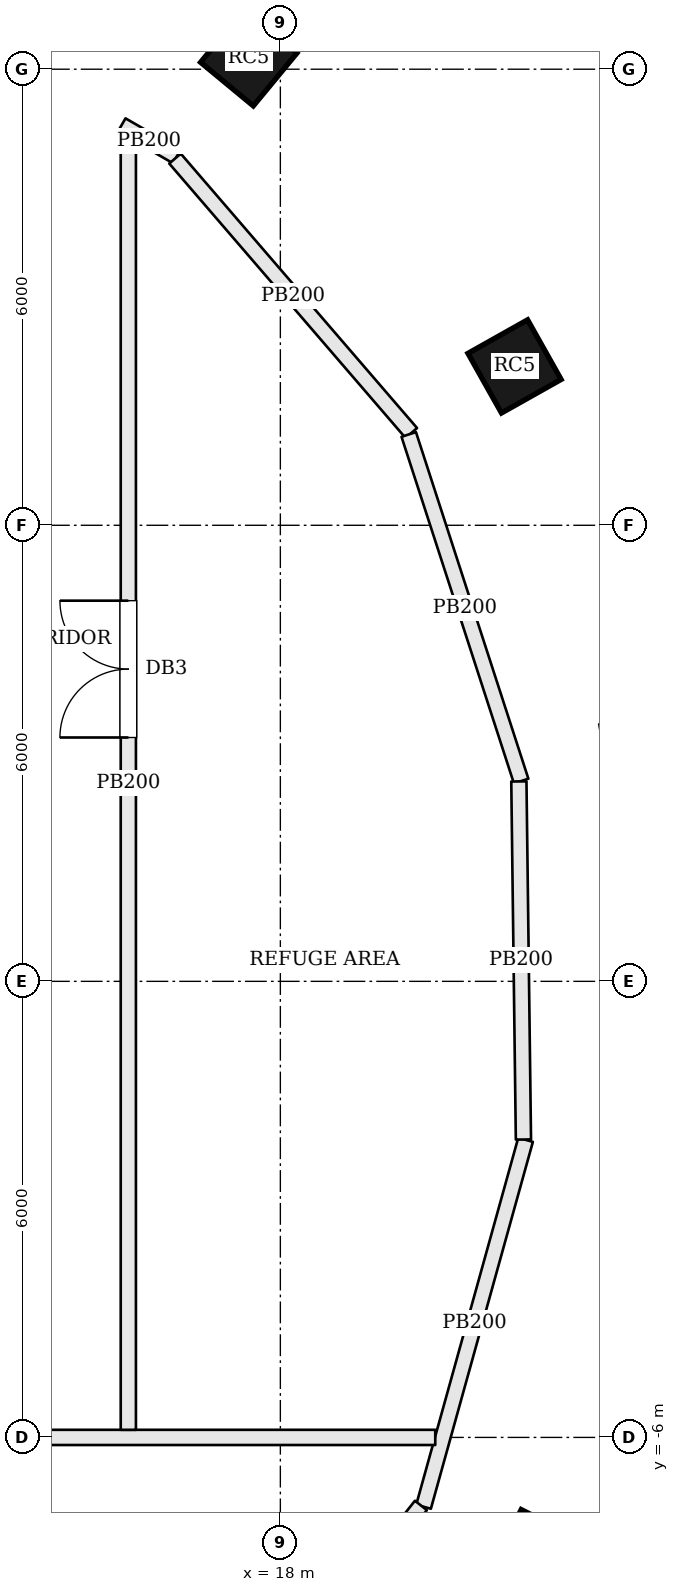
"""IFC4 building model, lengths in metres.
Left out: names, types, materials, properties, quantities, classifications, styles, units other than length and angle.
Written with IfcOpenShell. Run it as: python <this file> out.ifc"""

import sys

from ifc_helpers import new_model, si_unit, direction, frame, frame_2d, origin, origin_2d, place, context, subcontext, project, spatial, rectangle, extrude, element, fill, save


model = new_model("IFC4")
c1 = context("Model", 3, precision=1e-05, world=origin(), true_north=direction((0.0, 1.0)))
c2 = subcontext(c1, "Body", "Model", "MODEL_VIEW")
j1 = project(units=[si_unit("LENGTHUNIT", "METRE"), si_unit("PLANEANGLEUNIT", "RADIAN")], contexts=[c1])
p1 = place(None, origin())
s1 = spatial("IfcSite", under=j1, at=p1, CompositionType="ELEMENT")
p2 = place(p1, origin())
s2 = spatial("IfcBuilding", under=s1, at=p2, CompositionType="ELEMENT")
p3 = place(p2, frame((0.0, 0.0, 280.5)))
s3 = spatial("IfcBuildingStorey", under=s2, at=p3, CompositionType="ELEMENT", Elevation=280.5)
for number, where, z_axis, x_axis in (
    (1, (21.081, 8.09, 0.0), (0.0, 0.0, 1.0), (-0.49, 0.872, 0.0)),
    (2, (17.584, 12.151, 0.0), (0.0, 0.0, 1.0), (-0.771, 0.637, 0.0)),
    (3, (21.367, -7.554, 0.0), (0.0, 0.0, 1.0), (0.452, 0.892, 0.0)),
):
    element("IfcColumn", number, at=place(p3, frame(where, z_axis=z_axis, x_axis=x_axis)), inside=s3, PredefinedType="COLUMN", context=c2, shape_type="SweptSolid", body=[
        extrude(rectangle(XDim=0.9, YDim=0.9, at=origin_2d()), origin(), (0.0, 0.0, 1.0), 3.9),
    ])
p4 = place(p3, frame((23.849, 12.08, 0.0), z_axis=(0.0, 0.0, 1.0), x_axis=(-0.690057851873, 0.723754213161, 0.0)))
e4 = element("IfcWall", 4, at=p4, inside=s3, PredefinedType="SOLIDWALL", context=c2, shape_type="SweptSolid", body=[
    extrude(rectangle(XDim=4.253, YDim=0.45, at=frame_2d((2.126, 0.0))), origin(), (0.0, 0.0, 1.0), 3.7),
])
p5 = place(p4, frame((1.076, 0.0, 0.9)))
e5 = element("IfcOpeningElement", 5, at=p5, cuts=e4, PredefinedType="OPENING", context=c2, shape_type="SweptSolid", body=[
    extrude(rectangle(XDim=2.1, YDim=2.3, at=frame_2d((1.05, 1.15))), frame((0.0, 0.235, 0.0), z_axis=(0.0, -1.0, 0.0), x_axis=(1.0, 0.0, 0.0)), (0.0, 0.0, 1.0), 0.47),
])
p6 = place(p3, frame((21.226, -2.085, 0.0), z_axis=(0.0, 0.0, 1.0), x_axis=(-0.267859993319, -0.963457847536, 0.0)))
e6 = element("IfcWall", 6, at=p6, inside=s3, PredefinedType="PARTITIONING", context=c2, shape_type="SweptSolid", body=[
    extrude(rectangle(XDim=5.01, YDim=0.2, at=frame_2d((2.505, 0.0))), origin(), (0.0, 0.0, 1.0), 3.7),
])
p7 = place(p3, frame((19.849, -6.895, 0.0), z_axis=(0.0, 0.0, 1.0), x_axis=(-0.618811760178, -0.785539308669, 0.0)))
e7 = element("IfcWall", 7, at=p7, inside=s3, PredefinedType="PARTITIONING", context=c2, shape_type="SweptSolid", body=[
    extrude(rectangle(XDim=4.756, YDim=0.2, at=frame_2d((2.378, 0.0))), origin(), (0.0, 0.0, 1.0), 3.7),
])
p8 = place(p3, frame((-19.977, -6.0, 0.0), z_axis=(0.0, 0.0, 1.0), x_axis=(1.0, 0.0, 0.0)))
e8 = element("IfcWall", 8, at=p8, inside=s3, PredefinedType="PARTITIONING", context=c2, shape_type="SweptSolid", body=[
    extrude(rectangle(XDim=40.015, YDim=0.2, at=frame_2d((20.008, 0.0))), origin(), (0.0, 0.0, 1.0), 3.7),
])
p9 = place(p8, frame((19.077, 0.0, 0.0)))
e9 = element("IfcOpeningElement", 9, at=p9, cuts=e8, PredefinedType="OPENING", context=c2, shape_type="SweptSolid", body=[
    extrude(rectangle(XDim=1.8, YDim=2.1, at=frame_2d((0.9, 1.05))), frame((0.0, 0.11, 0.0), z_axis=(0.0, -1.0, 0.0), x_axis=(1.0, 0.0, 0.0)), (0.0, 0.0, 1.0), 0.22),
])
p10 = place(p3, frame((15.913, 11.267, 0.0), z_axis=(0.0, 0.0, 1.0), x_axis=(0.866219676164, -0.4996633593, 0.0)))
e10 = element("IfcWall", 10, at=p10, inside=s3, PredefinedType="PARTITIONING", context=c2, shape_type="SweptSolid", body=[
    extrude(rectangle(XDim=0.834, YDim=0.2, at=frame_2d((0.417, 0.0))), origin(), (0.0, 0.0, 1.0), 3.7),
])
p11 = place(p3, frame((16.614, 10.824, 0.0), z_axis=(0.0, 0.0, 1.0), x_axis=(0.652570543166, -0.757727976382, 0.0)))
e11 = element("IfcWall", 11, at=p11, inside=s3, PredefinedType="PARTITIONING", context=c2, shape_type="SweptSolid", body=[
    extrude(rectangle(XDim=4.764, YDim=0.2, at=frame_2d((2.382, 0.0))), origin(), (0.0, 0.0, 1.0), 3.7),
])
p12 = place(p3, frame((19.689, 7.195, 0.0), z_axis=(0.0, 0.0, 1.0), x_axis=(0.308517152125, -0.951218779695, 0.0)))
e12 = element("IfcWall", 12, at=p12, inside=s3, PredefinedType="PARTITIONING", context=c2, shape_type="SweptSolid", body=[
    extrude(rectangle(XDim=4.794, YDim=0.2, at=frame_2d((2.397, 0.0))), origin(), (0.0, 0.0, 1.0), 3.7),
])
p13 = place(p3, frame((21.138, 2.63, 0.0), z_axis=(0.0, 0.0, 1.0), x_axis=(0.012747720312, -0.999918744512, 0.0)))
e13 = element("IfcWall", 13, at=p13, inside=s3, PredefinedType="PARTITIONING", context=c2, shape_type="SweptSolid", body=[
    extrude(rectangle(XDim=4.711, YDim=0.2, at=frame_2d((2.356, 0.0))), origin(), (0.0, 0.0, 1.0), 3.7),
])
p14 = place(p3, frame((16.0, -5.9, 0.0), z_axis=(0.0, 0.0, 1.0), x_axis=(0.0, 1.0, 0.0)))
e14 = element("IfcWall", 14, at=p14, inside=s3, PredefinedType="PARTITIONING", context=c2, shape_type="SweptSolid", body=[
    extrude(rectangle(XDim=17.017, YDim=0.2, at=frame_2d((8.508, 0.0))), origin(), (0.0, 0.0, 1.0), 3.7),
])
p15 = place(p14, frame((9.108, 0.0, 0.0)))
e15 = element("IfcOpeningElement", 15, at=p15, cuts=e14, PredefinedType="OPENING", context=c2, shape_type="SweptSolid", body=[
    extrude(rectangle(XDim=1.8, YDim=2.1, at=frame_2d((0.9, 1.05))), frame((0.0, 0.11, 0.0), z_axis=(0.0, -1.0, 0.0), x_axis=(1.0, 0.0, 0.0)), (0.0, 0.0, 1.0), 0.22),
])
p16 = place(p15, origin())
e16 = element("IfcDoor", 16, at=p16, inside=s3, OperationType="DOUBLE_DOOR_SINGLE_SWING", PredefinedType="DOOR", context=c2, shape_type="SweptSolid", body=[
    extrude(rectangle(XDim=1.8, YDim=2.1, at=frame_2d((0.9, 1.05))), frame((0.0, 0.025, 0.0), z_axis=(0.0, -1.0, 0.0), x_axis=(1.0, 0.0, 0.0)), (0.0, 0.0, 1.0), 0.05),
])
fill(e15, e16)
save(model, sys.argv[1])
